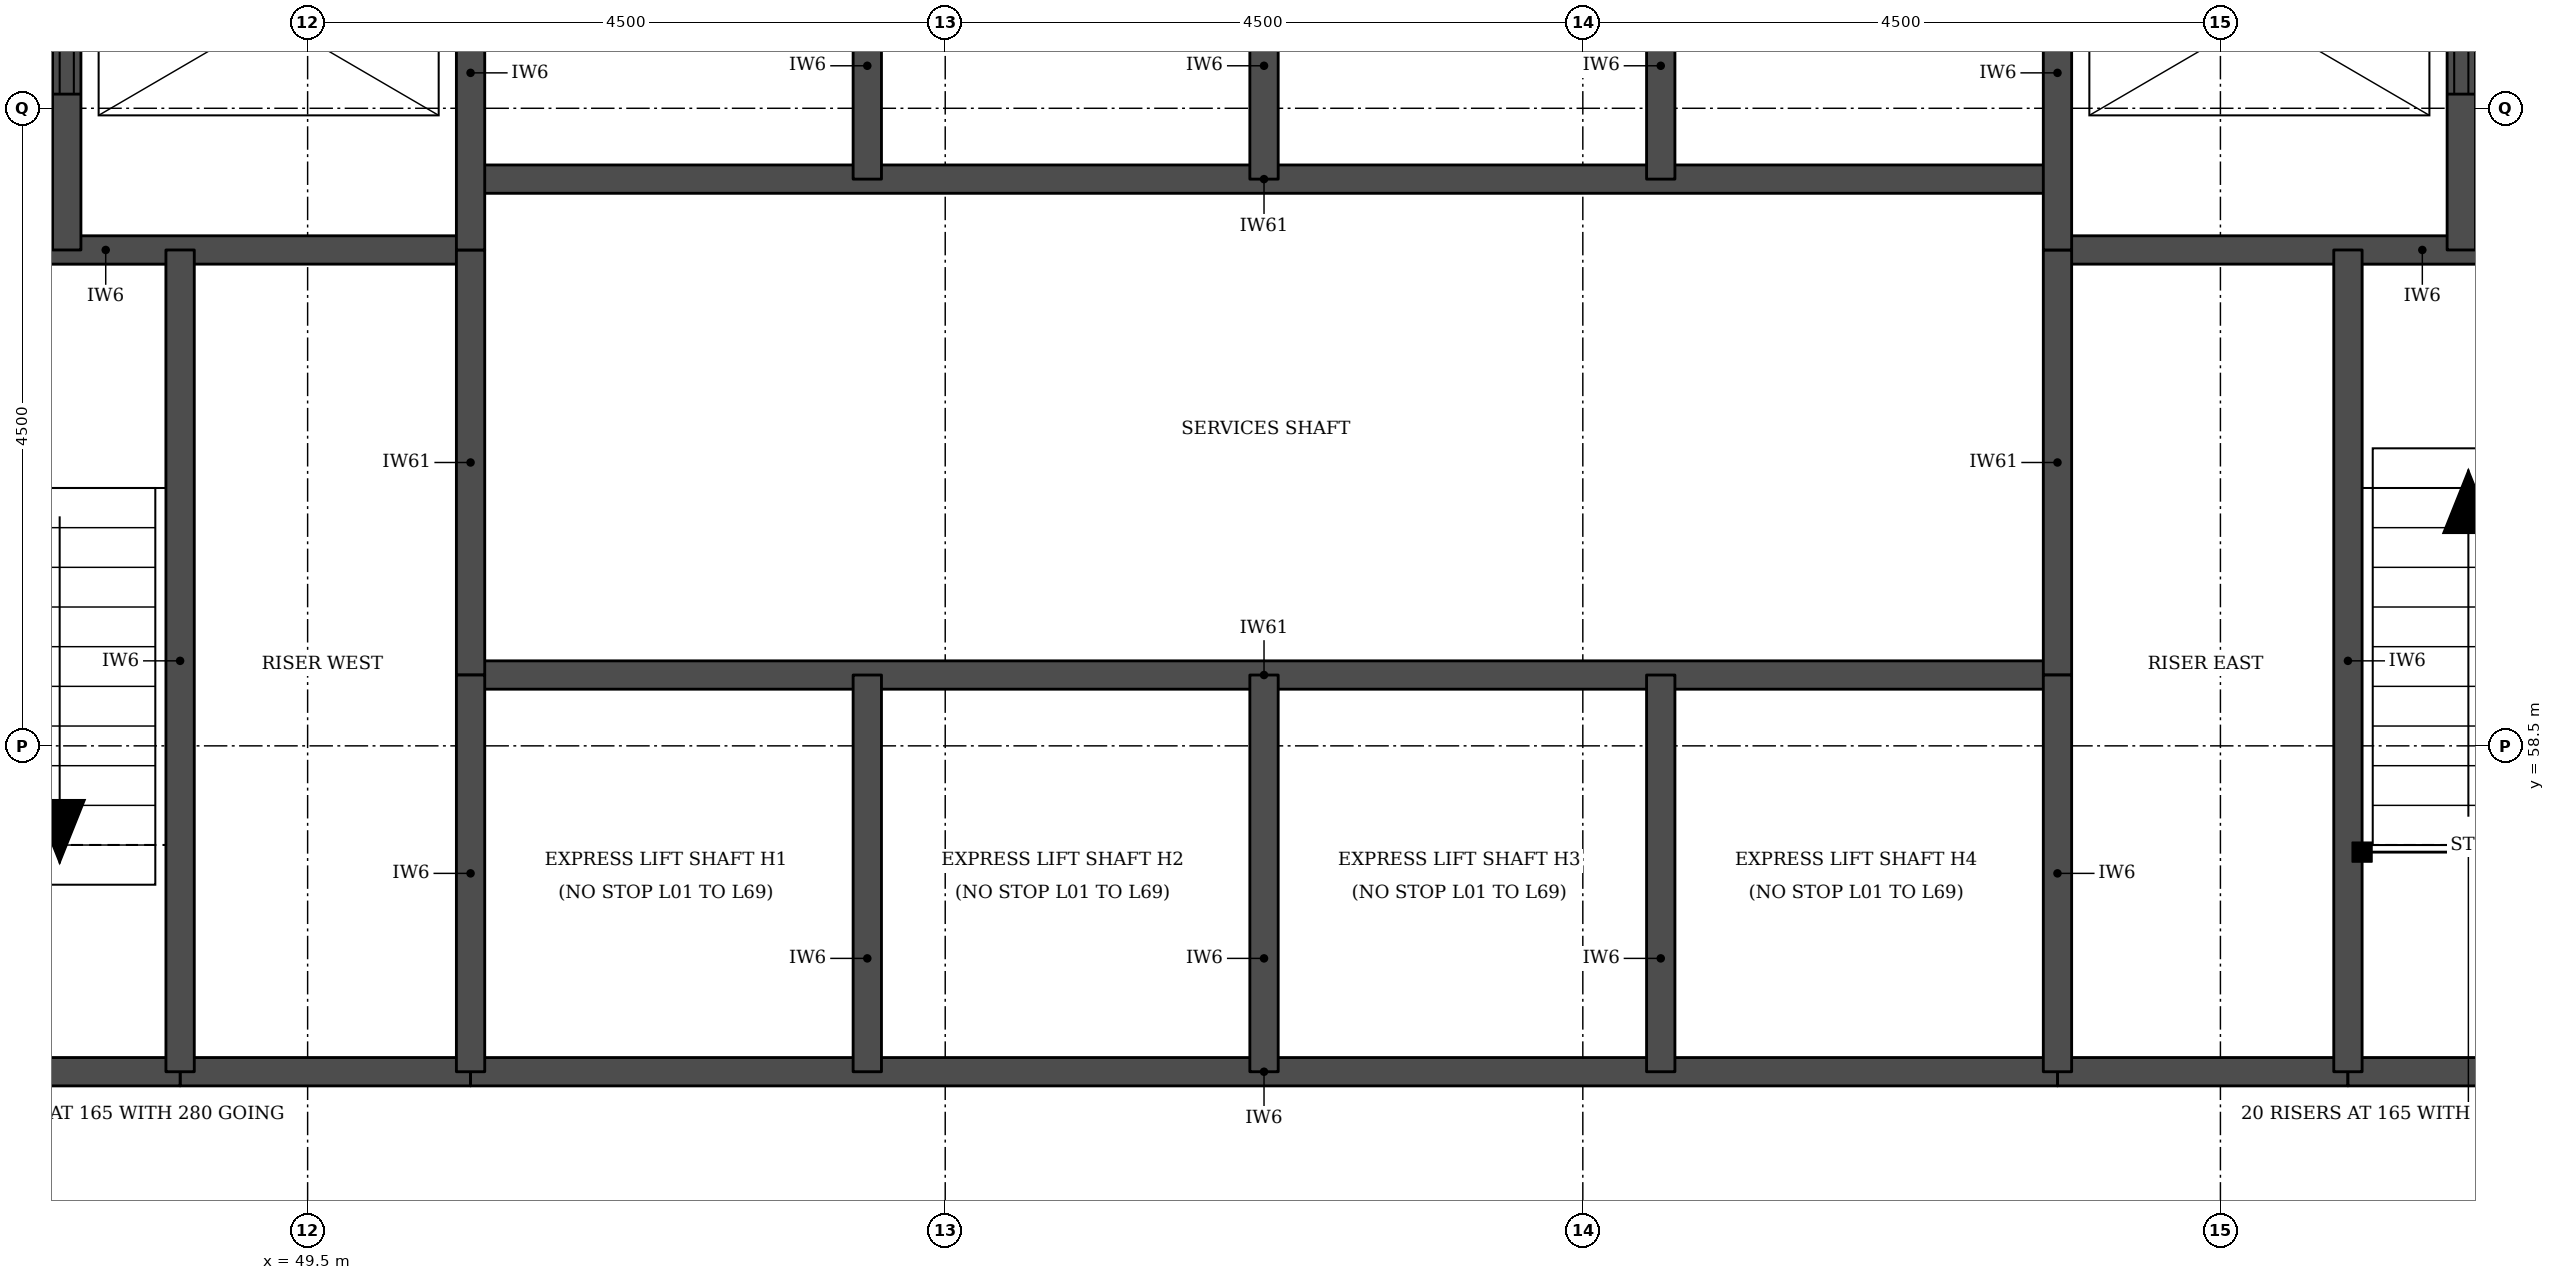
"""IFC4 building model, lengths in metres.
Left out: names, types, materials, properties, quantities, classifications, styles, units other than length and angle.
Written with IfcOpenShell. Run it as: python <this file> out.ifc"""

import sys

from ifc_helpers import new_model, si_unit, direction, frame, frame_2d, origin, place, context, subcontext, project, spatial, rectangle, extrude, element, fill, save


model = new_model("IFC4")
c1 = context("Model", 3, precision=1e-05, world=origin(), true_north=direction((0.0, 1.0)))
c2 = subcontext(c1, "Body", "Model", "MODEL_VIEW")
j1 = project(units=[si_unit("LENGTHUNIT", "METRE"), si_unit("PLANEANGLEUNIT", "RADIAN")], contexts=[c1])
p1 = place(None, origin())
s1 = spatial("IfcSite", under=j1, at=p1, CompositionType="ELEMENT")
p2 = place(p1, origin())
s2 = spatial("IfcBuilding", under=s1, at=p2, CompositionType="ELEMENT")
p3 = place(p2, frame((0.0, 0.0, 42.9)))
s3 = spatial("IfcBuildingStorey", under=s2, at=p3, CompositionType="ELEMENT", Elevation=42.9)
for number, where, z_axis, x_axis in (
    (1, (48.6, 56.2, 0.0), (0.0, 0.0, 1.0), (1.0, 0.0, 0.0)),
    (2, (61.85, 56.2, 0.0), (0.0, 0.0, 1.0), (1.0, 0.0, 0.0)),
):
    element("IfcWall", number, at=place(p3, frame(where, z_axis=z_axis, x_axis=x_axis)), inside=s3, PredefinedType="SOLIDWALL", context=c2, shape_type="SweptSolid", body=[
        extrude(rectangle(XDim=2.05, YDim=0.2, at=frame_2d((1.025, 0.0))), origin(), (0.0, 0.0, 1.0), 3.08),
    ])
p4 = place(p3, frame((45.5, 56.2, 0.0), z_axis=(0.0, 0.0, 1.0), x_axis=(1.0, 0.0, 0.0)))
e3 = element("IfcWall", 3, at=p4, inside=s3, PredefinedType="SOLIDWALL", context=c2, shape_type="SweptSolid", body=[
    extrude(rectangle(XDim=3.1, YDim=0.2, at=frame_2d((1.55, 0.0))), origin(), (0.0, 0.0, 1.0), 3.08),
])
p5 = place(p3, frame((50.65, 56.2, 0.0), z_axis=(0.0, 0.0, 1.0), x_axis=(1.0, 0.0, 0.0)))
e4 = element("IfcWall", 4, at=p5, inside=s3, PredefinedType="SOLIDWALL", context=c2, shape_type="SweptSolid", body=[
    extrude(rectangle(XDim=11.2, YDim=0.2, at=frame_2d((5.6, 0.0))), origin(), (0.0, 0.0, 1.0), 3.08),
])
p6 = place(p3, frame((63.9, 56.2, 0.0), z_axis=(0.0, 0.0, 1.0), x_axis=(1.0, 0.0, 0.0)))
e5 = element("IfcWall", 5, at=p6, inside=s3, PredefinedType="SOLIDWALL", context=c2, shape_type="SweptSolid", body=[
    extrude(rectangle(XDim=3.1, YDim=0.2, at=frame_2d((1.55, 0.0))), origin(), (0.0, 0.0, 1.0), 3.08),
])
p7 = place(p3, frame((50.65, 59.0, 0.0), z_axis=(0.0, 0.0, 1.0), x_axis=(1.0, 0.0, 0.0)))
e6 = element("IfcWall", 6, at=p7, inside=s3, PredefinedType="SOLIDWALL", context=c2, shape_type="SweptSolid", body=[
    extrude(rectangle(XDim=11.2, YDim=0.2, at=frame_2d((5.6, 0.0))), origin(), (0.0, 0.0, 1.0), 3.3),
])
for number, where, z_axis, x_axis in (
    (7, (45.5, 62.0, 0.0), (0.0, 0.0, 1.0), (1.0, 0.0, 0.0)),
    (8, (61.85, 62.0, 0.0), (0.0, 0.0, 1.0), (1.0, 0.0, 0.0)),
):
    element("IfcWall", number, at=place(p3, frame(where, z_axis=z_axis, x_axis=x_axis)), inside=s3, PredefinedType="SOLIDWALL", context=c2, shape_type="SweptSolid", body=[
        extrude(rectangle(XDim=5.15, YDim=0.2, at=frame_2d((2.575, 0.0))), origin(), (0.0, 0.0, 1.0), 3.08),
    ])
p8 = place(p3, frame((50.65, 62.5, 0.0), z_axis=(0.0, 0.0, 1.0), x_axis=(1.0, 0.0, 0.0)))
e9 = element("IfcWall", 9, at=p8, inside=s3, PredefinedType="SOLIDWALL", context=c2, shape_type="SweptSolid", body=[
    extrude(rectangle(XDim=11.2, YDim=0.2, at=frame_2d((5.6, 0.0))), origin(), (0.0, 0.0, 1.0), 3.3),
])
p9 = place(p3, frame((47.8, 62.0, 0.0), z_axis=(0.0, 0.0, 1.0), x_axis=(0.0, 1.0, 0.0)))
e10 = element("IfcWall", 10, at=p9, inside=s3, PredefinedType="SOLIDWALL", context=c2, shape_type="SweptSolid", body=[
    extrude(rectangle(XDim=3.3, YDim=0.2, at=frame_2d((1.65, 0.0))), origin(), (0.0, 0.0, 1.0), 3.08),
])
p10 = place(p9, frame((1.1, 0.0, 0.0)))
e11 = element("IfcOpeningElement", 11, at=p10, cuts=e10, PredefinedType="OPENING", context=c2, shape_type="SweptSolid", body=[
    extrude(rectangle(XDim=1.1, YDim=2.1, at=frame_2d((0.55, 1.05))), frame((0.0, 0.11, 0.0), z_axis=(0.0, -1.0, 0.0), x_axis=(1.0, 0.0, 0.0)), (0.0, 0.0, 1.0), 0.22),
])
p11 = place(p3, frame((48.6, 56.2, 0.0), z_axis=(0.0, 0.0, 1.0), x_axis=(0.0, 1.0, 0.0)))
e12 = element("IfcWall", 12, at=p11, inside=s3, PredefinedType="SOLIDWALL", context=c2, shape_type="SweptSolid", body=[
    extrude(rectangle(XDim=5.8, YDim=0.2, at=frame_2d((2.9, 0.0))), origin(), (0.0, 0.0, 1.0), 3.08),
])
p12 = place(p3, frame((50.65, 59.0, 0.0), z_axis=(0.0, 0.0, 1.0), x_axis=(0.0, 1.0, 0.0)))
e13 = element("IfcWall", 13, at=p12, inside=s3, PredefinedType="SOLIDWALL", context=c2, shape_type="SweptSolid", body=[
    extrude(rectangle(XDim=3.0, YDim=0.2, at=frame_2d((1.5, 0.0))), origin(), (0.0, 0.0, 1.0), 3.3),
])
p13 = place(p3, frame((50.65, 56.2, 0.0), z_axis=(0.0, 0.0, 1.0), x_axis=(0.0, 1.0, 0.0)))
e14 = element("IfcWall", 14, at=p13, inside=s3, PredefinedType="SOLIDWALL", context=c2, shape_type="SweptSolid", body=[
    extrude(rectangle(XDim=2.8, YDim=0.2, at=frame_2d((1.4, 0.0))), origin(), (0.0, 0.0, 1.0), 3.08),
])
p14 = place(p3, frame((50.65, 62.0, 0.0), z_axis=(0.0, 0.0, 1.0), x_axis=(0.0, 1.0, 0.0)))
e15 = element("IfcWall", 15, at=p14, inside=s3, PredefinedType="SOLIDWALL", context=c2, shape_type="SweptSolid", body=[
    extrude(rectangle(XDim=3.3, YDim=0.2, at=frame_2d((1.65, 0.0))), origin(), (0.0, 0.0, 1.0), 3.08),
])
for number, where, z_axis, x_axis in (
    (16, (53.45, 56.2, 0.0), (0.0, 0.0, 1.0), (0.0, 1.0, 0.0)),
    (17, (53.45, 62.5, 0.0), (0.0, 0.0, 1.0), (0.0, 1.0, 0.0)),
    (18, (56.25, 56.2, 0.0), (0.0, 0.0, 1.0), (0.0, 1.0, 0.0)),
    (19, (56.25, 62.5, 0.0), (0.0, 0.0, 1.0), (0.0, 1.0, 0.0)),
    (20, (59.05, 56.2, 0.0), (0.0, 0.0, 1.0), (0.0, 1.0, 0.0)),
    (21, (59.05, 62.5, 0.0), (0.0, 0.0, 1.0), (0.0, 1.0, 0.0)),
):
    element("IfcWall", number, at=place(p3, frame(where, z_axis=z_axis, x_axis=x_axis)), inside=s3, PredefinedType="SOLIDWALL", context=c2, shape_type="SweptSolid", body=[
        extrude(rectangle(XDim=2.8, YDim=0.2, at=frame_2d((1.4, 0.0))), origin(), (0.0, 0.0, 1.0), 3.08),
    ])
p15 = place(p3, frame((61.85, 59.0, 0.0), z_axis=(0.0, 0.0, 1.0), x_axis=(0.0, 1.0, 0.0)))
e22 = element("IfcWall", 22, at=p15, inside=s3, PredefinedType="SOLIDWALL", context=c2, shape_type="SweptSolid", body=[
    extrude(rectangle(XDim=3.0, YDim=0.2, at=frame_2d((1.5, 0.0))), origin(), (0.0, 0.0, 1.0), 3.3),
])
p16 = place(p3, frame((61.85, 56.2, 0.0), z_axis=(0.0, 0.0, 1.0), x_axis=(0.0, 1.0, 0.0)))
e23 = element("IfcWall", 23, at=p16, inside=s3, PredefinedType="SOLIDWALL", context=c2, shape_type="SweptSolid", body=[
    extrude(rectangle(XDim=2.8, YDim=0.2, at=frame_2d((1.4, 0.0))), origin(), (0.0, 0.0, 1.0), 3.08),
])
p17 = place(p3, frame((61.85, 62.0, 0.0), z_axis=(0.0, 0.0, 1.0), x_axis=(0.0, 1.0, 0.0)))
e24 = element("IfcWall", 24, at=p17, inside=s3, PredefinedType="SOLIDWALL", context=c2, shape_type="SweptSolid", body=[
    extrude(rectangle(XDim=3.3, YDim=0.2, at=frame_2d((1.65, 0.0))), origin(), (0.0, 0.0, 1.0), 3.08),
])
p18 = place(p3, frame((63.9, 56.2, 0.0), z_axis=(0.0, 0.0, 1.0), x_axis=(0.0, 1.0, 0.0)))
e25 = element("IfcWall", 25, at=p18, inside=s3, PredefinedType="SOLIDWALL", context=c2, shape_type="SweptSolid", body=[
    extrude(rectangle(XDim=5.8, YDim=0.2, at=frame_2d((2.9, 0.0))), origin(), (0.0, 0.0, 1.0), 3.08),
])
p19 = place(p3, frame((64.7, 62.0, 0.0), z_axis=(0.0, 0.0, 1.0), x_axis=(0.0, 1.0, 0.0)))
e26 = element("IfcWall", 26, at=p19, inside=s3, PredefinedType="SOLIDWALL", context=c2, shape_type="SweptSolid", body=[
    extrude(rectangle(XDim=3.3, YDim=0.2, at=frame_2d((1.65, 0.0))), origin(), (0.0, 0.0, 1.0), 3.08),
])
p20 = place(p19, frame((1.1, 0.0, 0.0)))
e27 = element("IfcOpeningElement", 27, at=p20, cuts=e26, PredefinedType="OPENING", context=c2, shape_type="SweptSolid", body=[
    extrude(rectangle(XDim=1.1, YDim=2.1, at=frame_2d((0.55, 1.05))), frame((0.0, 0.11, 0.0), z_axis=(0.0, -1.0, 0.0), x_axis=(1.0, 0.0, 0.0)), (0.0, 0.0, 1.0), 0.22),
])
p21 = place(p10, origin())
e28 = element("IfcDoor", 28, at=p21, inside=s3, OperationType="DOUBLE_DOOR_SLIDING", PredefinedType="DOOR", context=c2, shape_type="SweptSolid", body=[
    extrude(rectangle(XDim=1.1, YDim=2.1, at=frame_2d((0.55, 1.05))), frame((0.0, 0.025, 0.0), z_axis=(0.0, -1.0, 0.0), x_axis=(1.0, 0.0, 0.0)), (0.0, 0.0, 1.0), 0.05),
])
fill(e11, e28)
p22 = place(p20, origin())
e29 = element("IfcDoor", 29, at=p22, inside=s3, OperationType="DOUBLE_DOOR_SLIDING", PredefinedType="DOOR", context=c2, shape_type="SweptSolid", body=[
    extrude(rectangle(XDim=1.1, YDim=2.1, at=frame_2d((0.55, 1.05))), frame((0.0, 0.025, 0.0), z_axis=(0.0, -1.0, 0.0), x_axis=(1.0, 0.0, 0.0)), (0.0, 0.0, 1.0), 0.05),
])
fill(e27, e29)
save(model, sys.argv[1])
